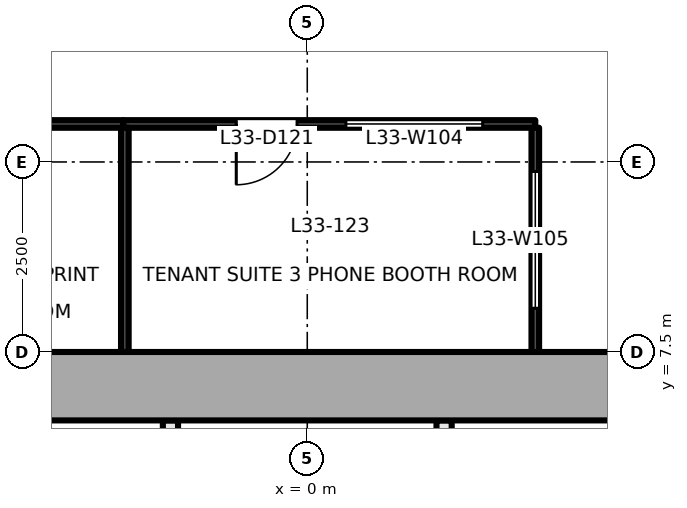
"""IFC4 building model, lengths in metres.
Left out: names, types, materials, properties, quantities, classifications, styles, units other than length and angle.
Written with IfcOpenShell. Run it as: python <this file> out.ifc"""

import sys

from ifc_helpers import new_model, si_unit, direction, frame, frame_2d, origin, place, context, subcontext, project, spatial, rectangle, extrude, element, fill, save


model = new_model("IFC4")
c1 = context("Model", 3, precision=1e-05, world=origin(), true_north=direction((0.0, 1.0)))
c2 = subcontext(c1, "Body", "Model", "MODEL_VIEW")
j1 = project(units=[si_unit("LENGTHUNIT", "METRE"), si_unit("PLANEANGLEUNIT", "RADIAN")], contexts=[c1])
p1 = place(None, origin())
s1 = spatial("IfcSite", under=j1, at=p1, CompositionType="ELEMENT")
p2 = place(p1, origin())
s2 = spatial("IfcBuilding", under=s1, at=p2, CompositionType="ELEMENT")
p3 = place(p2, frame((0.0, 0.0, 146.1)))
s3 = spatial("IfcBuildingStorey", under=s2, at=p3, CompositionType="ELEMENT", Elevation=146.1)
p4 = place(p3, frame((-18.0, 7.05, -0.2), z_axis=(0.0, 0.0, 1.0), x_axis=(1.0, 0.0, 0.0)))
e1 = element("IfcWall", 1, at=p4, inside=s3, PredefinedType="SHEAR", context=c2, shape_type="SweptSolid", body=[
    extrude(rectangle(XDim=36.0, YDim=0.9, at=frame_2d((18.0, 0.0))), origin(), (0.0, 0.0, 1.0), 4.0),
])
p5 = place(p3, frame((-1.8, -6.6, 0.0), z_axis=(0.0, 0.0, 1.0), x_axis=(0.0, 1.0, 0.0)))
e2 = element("IfcWall", 2, at=p5, inside=s3, PredefinedType="PARTITIONING", context=c2, shape_type="SweptSolid", body=[
    extrude(rectangle(XDim=13.2, YDim=0.2, at=frame_2d((6.6, 0.0))), origin(), (0.0, 0.0, 1.0), 3.8),
])
p6 = place(p5, frame((0.55, 0.0, 0.0)))
e3 = element("IfcOpeningElement", 3, at=p6, cuts=e2, PredefinedType="OPENING", context=c2, shape_type="SweptSolid", body=[
    extrude(rectangle(XDim=0.9, YDim=2.1, at=frame_2d((0.45, 1.05))), frame((0.0, 0.111, 0.0), z_axis=(0.0, -1.0, 0.0), x_axis=(1.0, 0.0, 0.0)), (0.0, 0.0, 1.0), 0.221),
])
p7 = place(p3, frame((1.8, -6.6, 0.0), z_axis=(0.0, 0.0, 1.0), x_axis=(0.0, 1.0, 0.0)))
e4 = element("IfcWall", 4, at=p7, inside=s3, PredefinedType="PARTITIONING", context=c2, shape_type="SweptSolid", body=[
    extrude(rectangle(XDim=13.2, YDim=0.2, at=frame_2d((6.6, 0.0))), origin(), (0.0, 0.0, 1.0), 3.8),
])
p8 = place(p7, frame((0.55, 0.0, 0.0)))
e5 = element("IfcOpeningElement", 5, at=p8, cuts=e4, PredefinedType="OPENING", context=c2, shape_type="SweptSolid", body=[
    extrude(rectangle(XDim=0.9, YDim=2.1, at=frame_2d((0.45, 1.05))), frame((0.0, 0.111, 0.0), z_axis=(0.0, -1.0, 0.0), x_axis=(1.0, 0.0, 0.0)), (0.0, 0.0, 1.0), 0.221),
])
p9 = place(p3, frame((-2.42, 10.5, 0.0), z_axis=(0.0, 0.0, 1.0), x_axis=(-1.0, 0.0, 0.0)))
e6 = element("IfcWall", 6, at=p9, inside=s3, PredefinedType="PARTITIONING", context=c2, shape_type="SweptSolid", body=[
    extrude(rectangle(XDim=3.56, YDim=0.1, at=frame_2d((1.78, 0.0))), origin(), (0.0, 0.0, 1.0), 3.5),
])
p10 = place(p9, frame((1.38, 0.0, 0.0)))
e7 = element("IfcOpeningElement", 7, at=p10, cuts=e6, PredefinedType="OPENING", context=c2, shape_type="SweptSolid", body=[
    extrude(rectangle(XDim=0.8, YDim=2.1, at=frame_2d((0.4, 1.05))), frame((0.0, 0.061, 0.0), z_axis=(0.0, -1.0, 0.0), x_axis=(1.0, 0.0, 0.0)), (0.0, 0.0, 1.0), 0.121),
])
p11 = place(p3, frame((3.0, 10.5, 0.0), z_axis=(0.0, 0.0, 1.0), x_axis=(-1.0, 0.0, 0.0)))
e8 = element("IfcWall", 8, at=p11, inside=s3, PredefinedType="PARTITIONING", context=c2, shape_type="SweptSolid", body=[
    extrude(rectangle(XDim=5.42, YDim=0.1, at=frame_2d((2.71, 0.0))), origin(), (0.0, 0.0, 1.0), 3.5),
])
p12 = place(p11, frame((3.134, 0.0, 0.0)))
e9 = element("IfcOpeningElement", 9, at=p12, cuts=e8, PredefinedType="OPENING", context=c2, shape_type="SweptSolid", body=[
    extrude(rectangle(XDim=0.8, YDim=2.1, at=frame_2d((0.4, 1.05))), frame((0.0, 0.061, 0.0), z_axis=(0.0, -1.0, 0.0), x_axis=(1.0, 0.0, 0.0)), (0.0, 0.0, 1.0), 0.121),
])
p13 = place(p11, frame((0.692, 0.0, 0.9)))
e10 = element("IfcOpeningElement", 10, at=p13, cuts=e8, PredefinedType="OPENING", context=c2, shape_type="SweptSolid", body=[
    extrude(rectangle(XDim=1.8, YDim=1.2, at=frame_2d((0.9, 0.6))), frame((0.0, 0.061, 0.0), z_axis=(0.0, -1.0, 0.0), x_axis=(1.0, 0.0, 0.0)), (0.0, 0.0, 1.0), 0.121),
])
p14 = place(p3, frame((3.0, 7.5, 0.0), z_axis=(0.0, 0.0, 1.0), x_axis=(0.0, 1.0, 0.0)))
e11 = element("IfcWall", 11, at=p14, inside=s3, PredefinedType="PARTITIONING", context=c2, shape_type="SweptSolid", body=[
    extrude(rectangle(XDim=2.95, YDim=0.1, at=frame_2d((1.475, 0.0))), origin(), (0.0, 0.0, 1.0), 3.8),
])
p15 = place(p14, frame((0.575, 0.0, 0.9)))
e12 = element("IfcOpeningElement", 12, at=p15, cuts=e11, PredefinedType="OPENING", context=c2, shape_type="SweptSolid", body=[
    extrude(rectangle(XDim=1.8, YDim=1.2, at=frame_2d((0.9, 0.6))), frame((0.0, 0.061, 0.0), z_axis=(0.0, -1.0, 0.0), x_axis=(1.0, 0.0, 0.0)), (0.0, 0.0, 1.0), 0.121),
])
p16 = place(p3, frame((-2.4, 10.45, 0.0), z_axis=(0.0, 0.0, 1.0), x_axis=(0.0, -1.0, 0.0)))
e13 = element("IfcWall", 13, at=p16, inside=s3, PredefinedType="PARTITIONING", context=c2, shape_type="SweptSolid", body=[
    extrude(rectangle(XDim=2.95, YDim=0.1, at=frame_2d((1.475, 0.0))), origin(), (0.0, 0.0, 1.0), 3.8),
])
p17 = place(p12, origin())
e14 = element("IfcDoor", 14, at=p17, inside=s3, OperationType="SINGLE_SWING_RIGHT", PredefinedType="DOOR", context=c2, shape_type="SweptSolid", body=[
    extrude(rectangle(XDim=0.8, YDim=2.1, at=frame_2d((0.4, 1.05))), frame((0.0, 0.025, 0.0), z_axis=(0.0, -1.0, 0.0), x_axis=(1.0, 0.0, 0.0)), (0.0, 0.0, 1.0), 0.05),
])
fill(e9, e14)
p18 = place(p13, origin())
e15 = element("IfcWindow", 15, at=p18, inside=s3, PartitioningType="SINGLE_PANEL", PredefinedType="WINDOW", context=c2, shape_type="SweptSolid", body=[
    extrude(rectangle(XDim=1.8, YDim=1.2, at=frame_2d((0.9, 0.6))), frame((0.0, 0.03, 0.0), z_axis=(0.0, -1.0, 0.0), x_axis=(1.0, 0.0, 0.0)), (0.0, 0.0, 1.0), 0.06),
])
fill(e10, e15)
p19 = place(p15, origin())
e16 = element("IfcWindow", 16, at=p19, inside=s3, PartitioningType="SINGLE_PANEL", PredefinedType="WINDOW", context=c2, shape_type="SweptSolid", body=[
    extrude(rectangle(XDim=1.8, YDim=1.2, at=frame_2d((0.9, 0.6))), frame((0.0, 0.03, 0.0), z_axis=(0.0, -1.0, 0.0), x_axis=(1.0, 0.0, 0.0)), (0.0, 0.0, 1.0), 0.06),
])
fill(e12, e16)
save(model, sys.argv[1])
